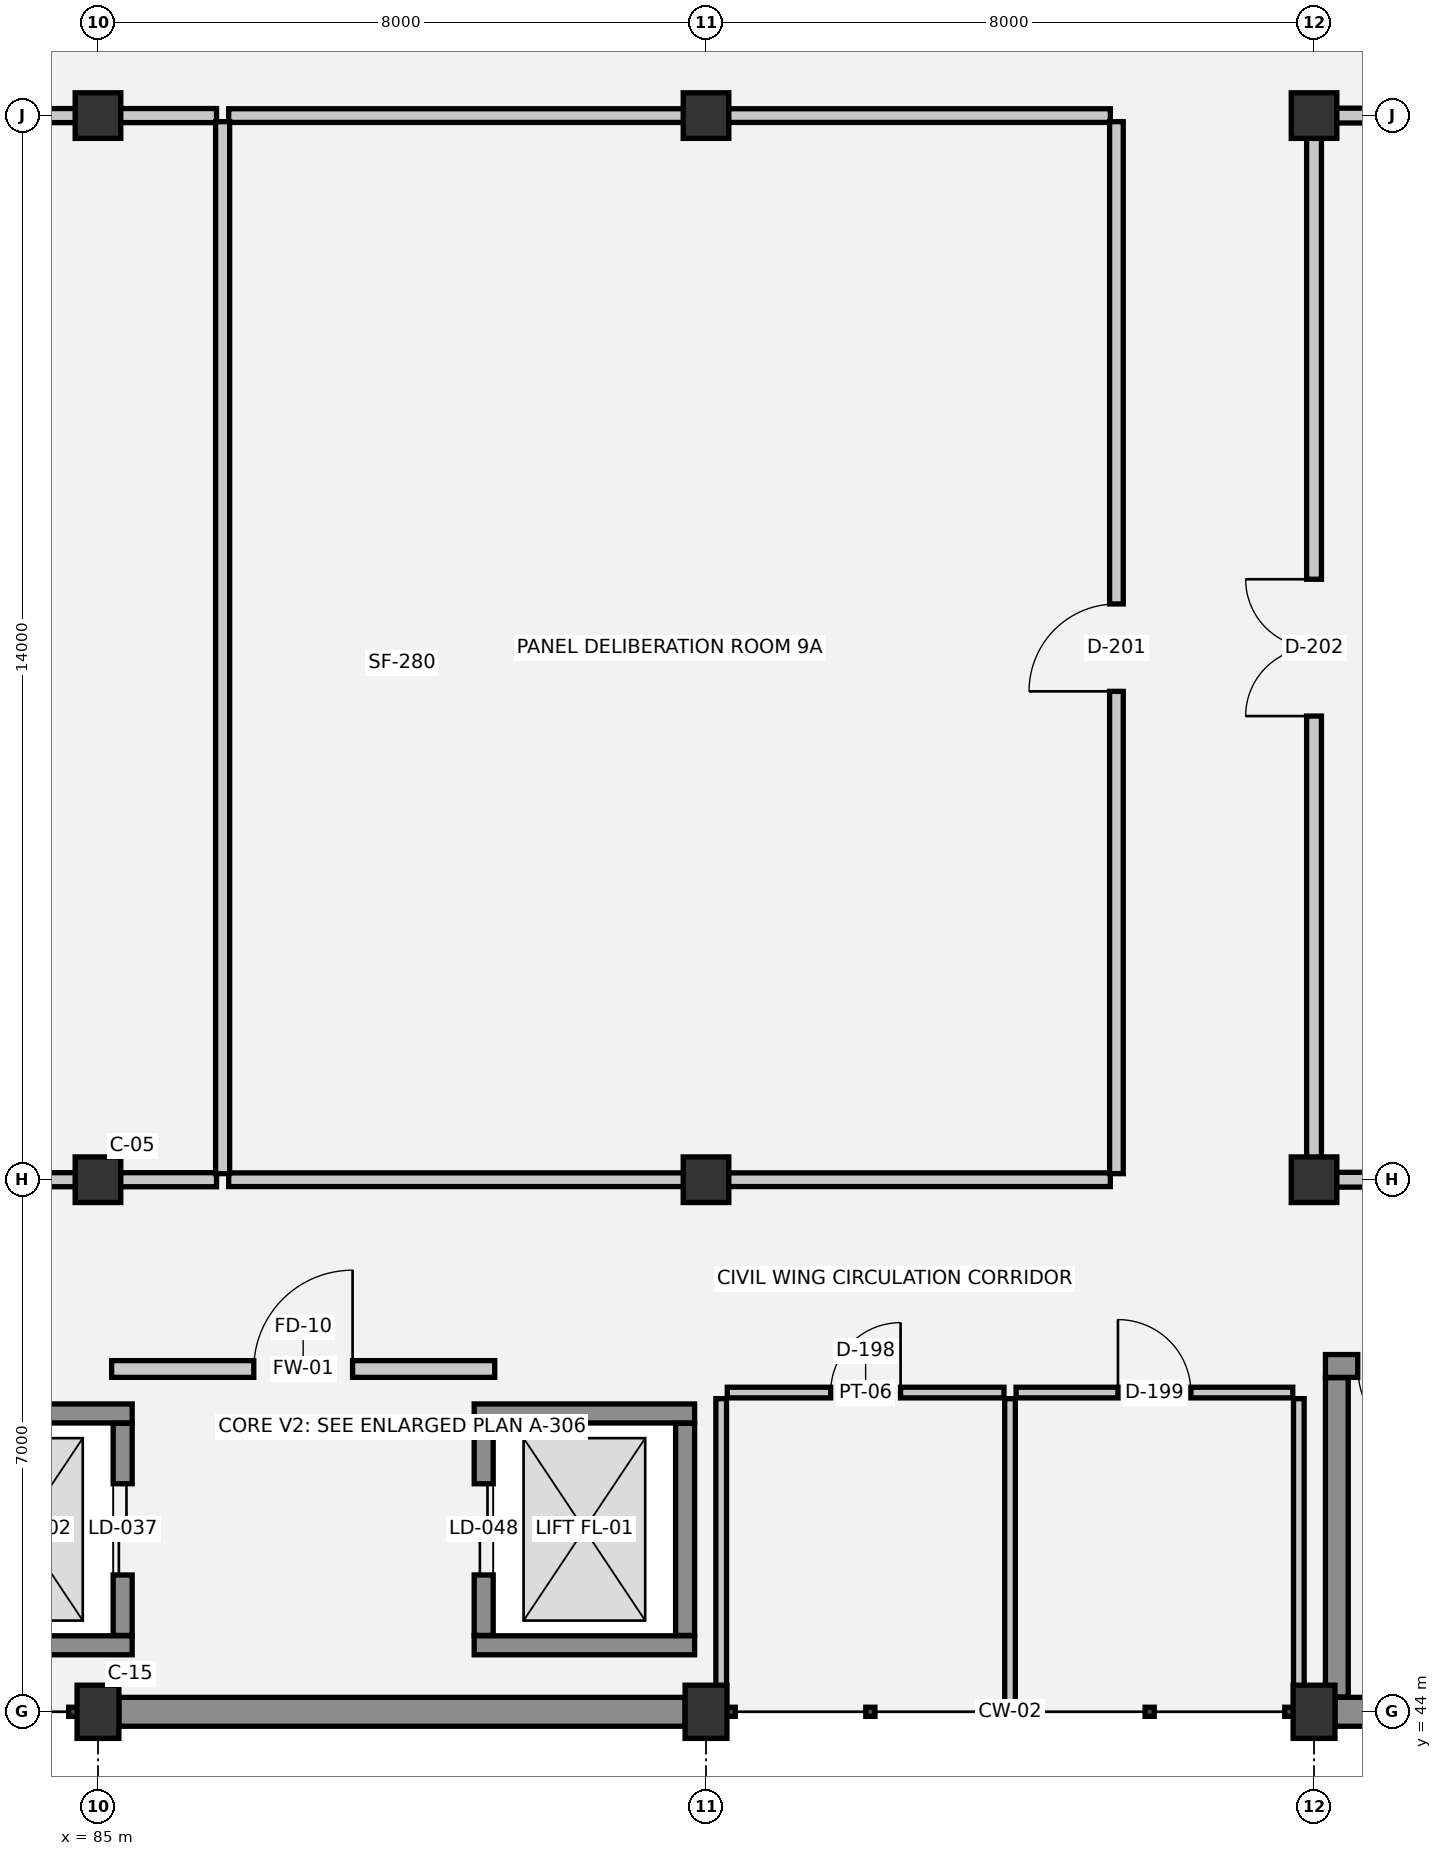
"""IFC4 building model, lengths in metres.
Left out: names, types, materials, properties, quantities, classifications, styles, units other than length and angle.
Written with IfcOpenShell. Run it as: python <this file> out.ifc"""

import sys

from ifc_helpers import new_model, si_unit, direction, frame, frame_2d, origin, origin_2d, place, context, subcontext, project, spatial, rectangle, extrude, element, fill, save


model = new_model("IFC4")
c1 = context("Model", 3, precision=1e-05, world=origin(), true_north=direction((0.0, 1.0)))
c2 = subcontext(c1, "Body", "Model", "MODEL_VIEW")
j1 = project(units=[si_unit("LENGTHUNIT", "METRE"), si_unit("PLANEANGLEUNIT", "RADIAN")], contexts=[c1])
p1 = place(None, origin())
s1 = spatial("IfcSite", under=j1, at=p1, CompositionType="ELEMENT")
p2 = place(p1, origin())
s2 = spatial("IfcBuilding", under=s1, at=p2, CompositionType="ELEMENT")
p3 = place(p2, frame((0.0, 0.0, 33.3)))
s3 = spatial("IfcBuildingStorey", under=s2, at=p3, CompositionType="ELEMENT", Elevation=33.3)
p4 = place(p3, frame((85.0, 44.0, 0.0), z_axis=(0.0, 0.0, 1.0), x_axis=(1.0, 0.0, 0.0)))
e1 = element("IfcColumn", 1, at=p4, inside=s3, PredefinedType="COLUMN", context=c2, shape_type="SweptSolid", body=[
    extrude(rectangle(XDim=0.55, YDim=0.7, at=origin_2d()), origin(), (0.0, 0.0, 1.0), 3.75),
])
for number, where, z_axis, x_axis in (
    (2, (85.0, 51.0, 0.0), (0.0, 0.0, 1.0), (1.0, 0.0, 0.0)),
    (3, (85.0, 65.0, 0.0), (0.0, 0.0, 1.0), (1.0, 0.0, 0.0)),
):
    element("IfcColumn", number, at=place(p3, frame(where, z_axis=z_axis, x_axis=x_axis)), inside=s3, PredefinedType="COLUMN", context=c2, shape_type="SweptSolid", body=[
        extrude(rectangle(XDim=0.6, YDim=0.6, at=origin_2d()), origin(), (0.0, 0.0, 1.0), 3.75),
    ])
p5 = place(p3, frame((93.0, 44.0, 0.0), z_axis=(0.0, 0.0, 1.0), x_axis=(1.0, 0.0, 0.0)))
e4 = element("IfcColumn", 4, at=p5, inside=s3, PredefinedType="COLUMN", context=c2, shape_type="SweptSolid", body=[
    extrude(rectangle(XDim=0.55, YDim=0.7, at=origin_2d()), origin(), (0.0, 0.0, 1.0), 3.75),
])
for number, where, z_axis, x_axis in (
    (5, (93.0, 51.0, 0.0), (0.0, 0.0, 1.0), (1.0, 0.0, 0.0)),
    (6, (93.0, 65.0, 0.0), (0.0, 0.0, 1.0), (1.0, 0.0, 0.0)),
):
    element("IfcColumn", number, at=place(p3, frame(where, z_axis=z_axis, x_axis=x_axis)), inside=s3, PredefinedType="COLUMN", context=c2, shape_type="SweptSolid", body=[
        extrude(rectangle(XDim=0.6, YDim=0.6, at=origin_2d()), origin(), (0.0, 0.0, 1.0), 3.75),
    ])
p6 = place(p3, frame((101.0, 44.0, 0.0), z_axis=(0.0, 0.0, 1.0), x_axis=(1.0, 0.0, 0.0)))
e7 = element("IfcColumn", 7, at=p6, inside=s3, PredefinedType="COLUMN", context=c2, shape_type="SweptSolid", body=[
    extrude(rectangle(XDim=0.55, YDim=0.7, at=origin_2d()), origin(), (0.0, 0.0, 1.0), 3.75),
])
for number, where, z_axis, x_axis in (
    (8, (101.0, 51.0, 0.0), (0.0, 0.0, 1.0), (1.0, 0.0, 0.0)),
    (9, (101.0, 65.0, 0.0), (0.0, 0.0, 1.0), (1.0, 0.0, 0.0)),
):
    element("IfcColumn", number, at=place(p3, frame(where, z_axis=z_axis, x_axis=x_axis)), inside=s3, PredefinedType="COLUMN", context=c2, shape_type="SweptSolid", body=[
        extrude(rectangle(XDim=0.6, YDim=0.6, at=origin_2d()), origin(), (0.0, 0.0, 1.0), 3.75),
    ])
for number, where, z_axis, x_axis in (
    (10, (108.725, 44.0, 0.0), (0.0, 0.0, 1.0), (-1.0, 0.0, 0.0)),
    (11, (92.725, 44.0, 0.0), (0.0, 0.0, 1.0), (-1.0, 0.0, 0.0)),
):
    element("IfcWall", number, at=place(p3, frame(where, z_axis=z_axis, x_axis=x_axis)), inside=s3, PredefinedType="STANDARD", context=c2, shape_type="SweptSolid", body=[
        extrude(rectangle(XDim=7.45, YDim=0.38, at=frame_2d((3.725, 0.0))), origin(), (0.0, 0.0, 1.0), 2.6),
    ])
for number, where, z_axis, x_axis in (
    (12, (82.55, 44.875, 0.0), (0.0, 0.0, 1.0), (1.0, 0.0, 0.0)),
    (13, (85.45, 47.925, 0.0), (0.0, 0.0, 1.0), (-1.0, 0.0, 0.0)),
):
    element("IfcWall", number, at=place(p3, frame(where, z_axis=z_axis, x_axis=x_axis)), inside=s3, PredefinedType="SHEAR", context=c2, shape_type="SweptSolid", body=[
        extrude(rectangle(XDim=2.9, YDim=0.25, at=frame_2d((1.45, 0.0))), origin(), (0.0, 0.0, 1.0), 3.75),
    ])
p7 = place(p3, frame((85.325, 45.005, 0.0), z_axis=(0.0, 0.0, 1.0), x_axis=(0.0, 1.0, 0.0)))
e14 = element("IfcWall", 14, at=p7, inside=s3, PredefinedType="SHEAR", context=c2, shape_type="SweptSolid", body=[
    extrude(rectangle(XDim=2.79, YDim=0.25, at=frame_2d((1.395, 0.0))), origin(), (0.0, 0.0, 1.0), 3.75),
])
p8 = place(p7, frame((0.795, 0.0, 0.0)))
e15 = element("IfcOpeningElement", 15, at=p8, cuts=e14, PredefinedType="OPENING", context=c2, shape_type="SweptSolid", body=[
    extrude(rectangle(XDim=1.2, YDim=2.2, at=frame_2d((0.6, 1.1))), frame((0.0, 0.135, 0.0), z_axis=(0.0, -1.0, 0.0), x_axis=(1.0, 0.0, 0.0)), (0.0, 0.0, 1.0), 0.27),
])
for number, where, z_axis, x_axis in (
    (16, (89.95, 44.875, 0.0), (0.0, 0.0, 1.0), (1.0, 0.0, 0.0)),
    (17, (92.85, 47.925, 0.0), (0.0, 0.0, 1.0), (-1.0, 0.0, 0.0)),
):
    element("IfcWall", number, at=place(p3, frame(where, z_axis=z_axis, x_axis=x_axis)), inside=s3, PredefinedType="SHEAR", context=c2, shape_type="SweptSolid", body=[
        extrude(rectangle(XDim=2.9, YDim=0.25, at=frame_2d((1.45, 0.0))), origin(), (0.0, 0.0, 1.0), 3.75),
    ])
p9 = place(p3, frame((90.075, 47.795, 0.0), z_axis=(0.0, 0.0, 1.0), x_axis=(0.0, -1.0, 0.0)))
e18 = element("IfcWall", 18, at=p9, inside=s3, PredefinedType="SHEAR", context=c2, shape_type="SweptSolid", body=[
    extrude(rectangle(XDim=2.79, YDim=0.25, at=frame_2d((1.395, 0.0))), origin(), (0.0, 0.0, 1.0), 3.75),
])
p10 = place(p9, frame((0.795, 0.0, 0.0)))
e19 = element("IfcOpeningElement", 19, at=p10, cuts=e18, PredefinedType="OPENING", context=c2, shape_type="SweptSolid", body=[
    extrude(rectangle(XDim=1.2, YDim=2.2, at=frame_2d((0.6, 1.1))), frame((0.0, 0.135, 0.0), z_axis=(0.0, -1.0, 0.0), x_axis=(1.0, 0.0, 0.0)), (0.0, 0.0, 1.0), 0.27),
])
p11 = place(p3, frame((92.725, 45.005, 0.0), z_axis=(0.0, 0.0, 1.0), x_axis=(0.0, 1.0, 0.0)))
e20 = element("IfcWall", 20, at=p11, inside=s3, PredefinedType="SHEAR", context=c2, shape_type="SweptSolid", body=[
    extrude(rectangle(XDim=2.79, YDim=0.25, at=frame_2d((1.395, 0.0))), origin(), (0.0, 0.0, 1.0), 3.75),
])
p12 = place(p3, frame((108.805, 48.55, 0.0), z_axis=(0.0, 0.0, 1.0), x_axis=(-1.0, 0.0, 0.0)))
e21 = element("IfcWall", 21, at=p12, inside=s3, PredefinedType="SHEAR", context=c2, shape_type="SweptSolid", body=[
    extrude(rectangle(XDim=7.655, YDim=0.3, at=frame_2d((3.828, 0.0))), origin(), (0.0, 0.0, 1.0), 3.47),
])
p13 = place(p12, frame((5.98, 0.0, 0.0)))
e22 = element("IfcOpeningElement", 22, at=p13, cuts=e21, PredefinedType="OPENING", context=c2, shape_type="SweptSolid", body=[
    extrude(rectangle(XDim=1.25, YDim=2.15, at=frame_2d((0.625, 1.075))), frame((0.0, 0.16, 0.0), z_axis=(0.0, -1.0, 0.0), x_axis=(1.0, 0.0, 0.0)), (0.0, 0.0, 1.0), 0.32),
])
p14 = place(p3, frame((101.3, 48.395, 0.0), z_axis=(0.0, 0.0, 1.0), x_axis=(0.0, -1.0, 0.0)))
e23 = element("IfcWall", 23, at=p14, inside=s3, PredefinedType="SHEAR", context=c2, shape_type="SweptSolid", body=[
    extrude(rectangle(XDim=4.2, YDim=0.3, at=frame_2d((2.1, 0.0))), origin(), (0.0, 0.0, 1.0), 3.47),
])
p15 = place(p3, frame((85.18, 48.51, 0.0), z_axis=(0.0, 0.0, 1.0), x_axis=(1.0, 0.0, 0.0)))
e24 = element("IfcWall", 24, at=p15, inside=s3, PredefinedType="SOLIDWALL", context=c2, shape_type="SweptSolid", body=[
    extrude(rectangle(XDim=5.04, YDim=0.22, at=frame_2d((2.52, 0.0))), origin(), (0.0, 0.0, 1.0), 3.47),
])
p16 = place(p15, frame((1.87, 0.0, 0.0)))
e25 = element("IfcOpeningElement", 25, at=p16, cuts=e24, PredefinedType="OPENING", context=c2, shape_type="SweptSolid", body=[
    extrude(rectangle(XDim=1.3, YDim=2.15, at=frame_2d((0.65, 1.075))), frame((0.0, 0.12, 0.0), z_axis=(0.0, -1.0, 0.0), x_axis=(1.0, 0.0, 0.0)), (0.0, 0.0, 1.0), 0.24),
])
p17 = place(p3, frame((93.28, 48.2, 0.0), z_axis=(0.0, 0.0, 1.0), x_axis=(1.0, 0.0, 0.0)))
e26 = element("IfcWall", 26, at=p17, inside=s3, PredefinedType="PLUMBINGWALL", context=c2, shape_type="SweptSolid", body=[
    extrude(rectangle(XDim=3.64, YDim=0.14, at=frame_2d((1.82, 0.0))), origin(), (0.0, 0.0, 1.0), 3.39),
])
p18 = place(p17, frame((1.36, 0.0, 0.0)))
e27 = element("IfcOpeningElement", 27, at=p18, cuts=e26, PredefinedType="OPENING", context=c2, shape_type="SweptSolid", body=[
    extrude(rectangle(XDim=0.92, YDim=2.1, at=frame_2d((0.46, 1.05))), frame((0.0, 0.08, 0.0), z_axis=(0.0, -1.0, 0.0), x_axis=(1.0, 0.0, 0.0)), (0.0, 0.0, 1.0), 0.16),
])
p19 = place(p3, frame((97.08, 48.2, 0.0), z_axis=(0.0, 0.0, 1.0), x_axis=(1.0, 0.0, 0.0)))
e28 = element("IfcWall", 28, at=p19, inside=s3, PredefinedType="PLUMBINGWALL", context=c2, shape_type="SweptSolid", body=[
    extrude(rectangle(XDim=3.64, YDim=0.14, at=frame_2d((1.82, 0.0))), origin(), (0.0, 0.0, 1.0), 3.39),
])
p20 = place(p19, frame((1.34, 0.0, 0.0)))
e29 = element("IfcOpeningElement", 29, at=p20, cuts=e28, PredefinedType="OPENING", context=c2, shape_type="SweptSolid", body=[
    extrude(rectangle(XDim=0.96, YDim=2.1, at=frame_2d((0.48, 1.05))), frame((0.0, 0.08, 0.0), z_axis=(0.0, -1.0, 0.0), x_axis=(1.0, 0.0, 0.0)), (0.0, 0.0, 1.0), 0.16),
])
p21 = place(p3, frame((82.4, 51.0, 0.0), z_axis=(0.0, 0.0, 1.0), x_axis=(1.0, 0.0, 0.0)))
e30 = element("IfcWall", 30, at=p21, inside=s3, PredefinedType="PARTITIONING", context=c2, shape_type="SweptSolid", body=[
    extrude(rectangle(XDim=4.16, YDim=0.185, at=frame_2d((2.08, 0.0))), origin(), (0.0, 0.0, 1.0), 2.82),
])
p22 = place(p3, frame((86.72, 51.0, 0.0), z_axis=(0.0, 0.0, 1.0), x_axis=(1.0, 0.0, 0.0)))
e31 = element("IfcWall", 31, at=p22, inside=s3, PredefinedType="PARTITIONING", context=c2, shape_type="SweptSolid", body=[
    extrude(rectangle(XDim=11.6, YDim=0.18, at=frame_2d((5.8, 0.0))), origin(), (0.0, 0.0, 1.0), 2.82),
])
p23 = place(p3, frame((101.08, 51.0, 0.0), z_axis=(0.0, 0.0, 1.0), x_axis=(1.0, 0.0, 0.0)))
e32 = element("IfcWall", 32, at=p23, inside=s3, PredefinedType="PARTITIONING", context=c2, shape_type="SweptSolid", body=[
    extrude(rectangle(XDim=7.84, YDim=0.195, at=frame_2d((3.92, 0.0))), origin(), (0.0, 0.0, 1.0), 2.82),
])
p24 = place(p3, frame((69.08, 65.0, 0.0), z_axis=(0.0, 0.0, 1.0), x_axis=(1.0, 0.0, 0.0)))
e33 = element("IfcWall", 33, at=p24, inside=s3, PredefinedType="PARTITIONING", context=c2, shape_type="SweptSolid", body=[
    extrude(rectangle(XDim=17.48, YDim=0.185, at=frame_2d((8.74, 0.0))), origin(), (0.0, 0.0, 1.0), 2.82),
])
p25 = place(p24, frame((5.593, 0.0, 0.0)))
e34 = element("IfcOpeningElement", 34, at=p25, cuts=e33, PredefinedType="OPENING", context=c2, shape_type="SweptSolid", body=[
    extrude(rectangle(XDim=1.8, YDim=2.3, at=frame_2d((0.9, 1.15))), frame((0.0, 0.103, 0.0), z_axis=(0.0, -1.0, 0.0), x_axis=(1.0, 0.0, 0.0)), (0.0, 0.0, 1.0), 0.205),
])
p26 = place(p3, frame((86.72, 65.0, 0.0), z_axis=(0.0, 0.0, 1.0), x_axis=(1.0, 0.0, 0.0)))
e35 = element("IfcWall", 35, at=p26, inside=s3, PredefinedType="PARTITIONING", context=c2, shape_type="SweptSolid", body=[
    extrude(rectangle(XDim=11.6, YDim=0.18, at=frame_2d((5.8, 0.0))), origin(), (0.0, 0.0, 1.0), 2.82),
])
p27 = place(p3, frame((101.08, 65.0, 0.0), z_axis=(0.0, 0.0, 1.0), x_axis=(1.0, 0.0, 0.0)))
e36 = element("IfcWall", 36, at=p27, inside=s3, PredefinedType="PARTITIONING", context=c2, shape_type="SweptSolid", body=[
    extrude(rectangle(XDim=7.84, YDim=0.195, at=frame_2d((3.92, 0.0))), origin(), (0.0, 0.0, 1.0), 2.82),
])
p28 = place(p3, frame((86.64, 51.08, 0.0), z_axis=(0.0, 0.0, 1.0), x_axis=(0.0, 1.0, 0.0)))
e37 = element("IfcWall", 37, at=p28, inside=s3, PredefinedType="PARTITIONING", context=c2, shape_type="SweptSolid", body=[
    extrude(rectangle(XDim=13.84, YDim=0.185, at=frame_2d((6.92, 0.0))), origin(), (0.0, 0.0, 1.0), 3.39),
])
for number, where, z_axis, x_axis in (
    (38, (93.2, 44.08, 0.0), (0.0, 0.0, 1.0), (0.0, 1.0, 0.0)),
    (39, (97.0, 44.08, 0.0), (0.0, 0.0, 1.0), (0.0, 1.0, 0.0)),
):
    element("IfcWall", number, at=place(p3, frame(where, z_axis=z_axis, x_axis=x_axis)), inside=s3, PredefinedType="PLUMBINGWALL", context=c2, shape_type="SweptSolid", body=[
        extrude(rectangle(XDim=4.04, YDim=0.14, at=frame_2d((2.02, 0.0))), origin(), (0.0, 0.0, 1.0), 3.39),
    ])
p29 = place(p3, frame((98.4, 51.08, 0.0), z_axis=(0.0, 0.0, 1.0), x_axis=(0.0, 1.0, 0.0)))
e40 = element("IfcWall", 40, at=p29, inside=s3, PredefinedType="PARTITIONING", context=c2, shape_type="SweptSolid", body=[
    extrude(rectangle(XDim=13.84, YDim=0.18, at=frame_2d((6.92, 0.0))), origin(), (0.0, 0.0, 1.0), 3.39),
])
p30 = place(p29, frame((6.345, 0.0, 0.0)))
e41 = element("IfcOpeningElement", 41, at=p30, cuts=e40, PredefinedType="OPENING", context=c2, shape_type="SweptSolid", body=[
    extrude(rectangle(XDim=1.15, YDim=2.2, at=frame_2d((0.575, 1.1))), frame((0.0, 0.1, 0.0), z_axis=(0.0, -1.0, 0.0), x_axis=(1.0, 0.0, 0.0)), (0.0, 0.0, 1.0), 0.2),
])
p31 = place(p3, frame((100.8, 44.08, 0.0), z_axis=(0.0, 0.0, 1.0), x_axis=(0.0, 1.0, 0.0)))
e42 = element("IfcWall", 42, at=p31, inside=s3, PredefinedType="PLUMBINGWALL", context=c2, shape_type="SweptSolid", body=[
    extrude(rectangle(XDim=4.04, YDim=0.14, at=frame_2d((2.02, 0.0))), origin(), (0.0, 0.0, 1.0), 3.39),
])
p32 = place(p3, frame((101.0, 51.08, 0.0), z_axis=(0.0, 0.0, 1.0), x_axis=(0.0, 1.0, 0.0)))
e43 = element("IfcWall", 43, at=p32, inside=s3, PredefinedType="PARTITIONING", context=c2, shape_type="SweptSolid", body=[
    extrude(rectangle(XDim=13.84, YDim=0.195, at=frame_2d((6.92, 0.0))), origin(), (0.0, 0.0, 1.0), 2.62),
])
p33 = place(p32, frame((6.02, 0.0, 0.0)))
e44 = element("IfcOpeningElement", 44, at=p33, cuts=e43, PredefinedType="OPENING", context=c2, shape_type="SweptSolid", body=[
    extrude(rectangle(XDim=1.8, YDim=2.3, at=frame_2d((0.9, 1.15))), frame((0.0, 0.107, 0.0), z_axis=(0.0, -1.0, 0.0), x_axis=(1.0, 0.0, 0.0)), (0.0, 0.0, 1.0), 0.215),
])
p34 = place(p8, origin())
e45 = element("IfcDoor", 45, at=p34, inside=s3, OperationType="DOUBLE_DOOR_SLIDING", PredefinedType="DOOR", context=c2, shape_type="SweptSolid", body=[
    extrude(rectangle(XDim=1.2, YDim=2.2, at=frame_2d((0.6, 1.1))), frame((0.0, 0.025, 0.0), z_axis=(0.0, -1.0, 0.0), x_axis=(1.0, 0.0, 0.0)), (0.0, 0.0, 1.0), 0.05),
])
fill(e15, e45)
p35 = place(p10, origin())
e46 = element("IfcDoor", 46, at=p35, inside=s3, OperationType="DOUBLE_DOOR_SLIDING", PredefinedType="DOOR", context=c2, shape_type="SweptSolid", body=[
    extrude(rectangle(XDim=1.2, YDim=2.2, at=frame_2d((0.6, 1.1))), frame((0.0, 0.025, 0.0), z_axis=(0.0, -1.0, 0.0), x_axis=(1.0, 0.0, 0.0)), (0.0, 0.0, 1.0), 0.05),
])
fill(e19, e46)
p36 = place(p13, origin())
e47 = element("IfcDoor", 47, at=p36, inside=s3, OperationType="SINGLE_SWING_LEFT", PredefinedType="DOOR", context=c2, shape_type="SweptSolid", body=[
    extrude(rectangle(XDim=1.25, YDim=2.15, at=frame_2d((0.625, 1.075))), frame((0.0, 0.025, 0.0), z_axis=(0.0, -1.0, 0.0), x_axis=(1.0, 0.0, 0.0)), (0.0, 0.0, 1.0), 0.05),
])
fill(e22, e47)
p37 = place(p16, origin())
e48 = element("IfcDoor", 48, at=p37, inside=s3, OperationType="SINGLE_SWING_RIGHT", PredefinedType="DOOR", context=c2, shape_type="SweptSolid", body=[
    extrude(rectangle(XDim=1.3, YDim=2.15, at=frame_2d((0.65, 1.075))), frame((0.0, 0.025, 0.0), z_axis=(0.0, -1.0, 0.0), x_axis=(1.0, 0.0, 0.0)), (0.0, 0.0, 1.0), 0.05),
])
fill(e25, e48)
p38 = place(p18, origin())
e49 = element("IfcDoor", 49, at=p38, inside=s3, OperationType="SINGLE_SWING_RIGHT", PredefinedType="DOOR", context=c2, shape_type="SweptSolid", body=[
    extrude(rectangle(XDim=0.92, YDim=2.1, at=frame_2d((0.46, 1.05))), frame((0.0, 0.025, 0.0), z_axis=(0.0, -1.0, 0.0), x_axis=(1.0, 0.0, 0.0)), (0.0, 0.0, 1.0), 0.05),
])
fill(e27, e49)
p39 = place(p20, origin())
e50 = element("IfcDoor", 50, at=p39, inside=s3, OperationType="SINGLE_SWING_LEFT", PredefinedType="DOOR", context=c2, shape_type="SweptSolid", body=[
    extrude(rectangle(XDim=0.96, YDim=2.1, at=frame_2d((0.48, 1.05))), frame((0.0, 0.025, 0.0), z_axis=(0.0, -1.0, 0.0), x_axis=(1.0, 0.0, 0.0)), (0.0, 0.0, 1.0), 0.05),
])
fill(e29, e50)
p40 = place(p30, origin())
e51 = element("IfcDoor", 51, at=p40, inside=s3, OperationType="SINGLE_SWING_LEFT", PredefinedType="DOOR", context=c2, shape_type="SweptSolid", body=[
    extrude(rectangle(XDim=1.15, YDim=2.2, at=frame_2d((0.575, 1.1))), frame((0.0, 0.025, 0.0), z_axis=(0.0, -1.0, 0.0), x_axis=(1.0, 0.0, 0.0)), (0.0, 0.0, 1.0), 0.05),
])
fill(e41, e51)
p41 = place(p33, origin())
e52 = element("IfcDoor", 52, at=p41, inside=s3, OperationType="DOUBLE_DOOR_SINGLE_SWING", PredefinedType="DOOR", context=c2, shape_type="SweptSolid", body=[
    extrude(rectangle(XDim=1.8, YDim=2.3, at=frame_2d((0.9, 1.15))), frame((0.0, 0.025, 0.0), z_axis=(0.0, -1.0, 0.0), x_axis=(1.0, 0.0, 0.0)), (0.0, 0.0, 1.0), 0.05),
])
fill(e44, e52)
save(model, sys.argv[1])
